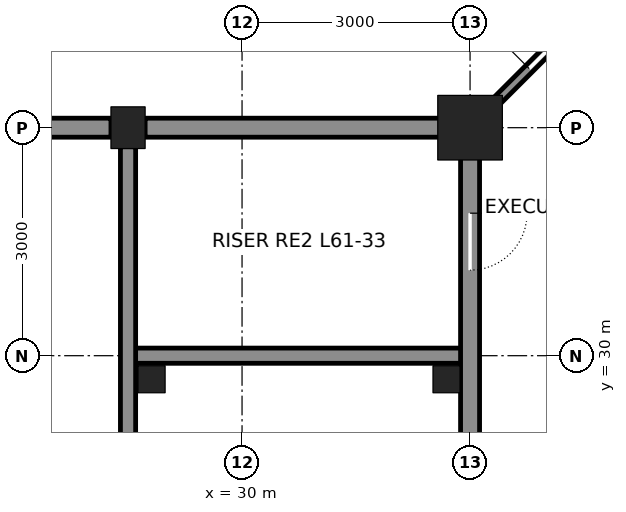
"""IFC4 building model, lengths in metres.
Left out: names, types, materials, properties, quantities, classifications, styles, units other than length and angle.
Written with IfcOpenShell. Run it as: python <this file> out.ifc"""

import sys

from ifc_helpers import new_model, si_unit, direction, frame, frame_2d, origin, origin_2d, place, context, subcontext, project, spatial, rectangle, hollow_rectangle, i_section, extrude, element, fill, save


model = new_model("IFC4")
c1 = context("Model", 3, precision=1e-05, world=origin(), true_north=direction((0.0, 1.0)))
c2 = subcontext(c1, "Body", "Model", "MODEL_VIEW")
j1 = project(units=[si_unit("LENGTHUNIT", "METRE"), si_unit("PLANEANGLEUNIT", "RADIAN")], contexts=[c1])
p1 = place(None, origin())
s1 = spatial("IfcSite", under=j1, at=p1, CompositionType="ELEMENT")
p2 = place(p1, origin())
s2 = spatial("IfcBuilding", under=s1, at=p2, CompositionType="ELEMENT")
p3 = place(p2, frame((0.0, 0.0, 274.8)))
s3 = spatial("IfcBuildingStorey", under=s2, at=p3, CompositionType="ELEMENT", Elevation=274.8)
p4 = place(p3, frame((28.5, 33.0, 0.0), z_axis=(0.0, 0.0, 1.0), x_axis=(1.0, 0.0, 0.0)))
e1 = element("IfcColumn", 1, at=p4, inside=s3, PredefinedType="COLUMN", context=c2, shape_type="SweptSolid", body=[
    extrude(i_section(OverallWidth=0.449, OverallDepth=0.549, WebThickness=0.072, FlangeThickness=0.115, at=origin_2d()), origin(), (0.0, 0.0, 1.0), 4.2),
])
p5 = place(p3, frame((33.0, 33.0, 0.0), z_axis=(0.0, 0.0, 1.0), x_axis=(1.0, 0.0, 0.0)))
e2 = element("IfcColumn", 2, at=p5, inside=s3, PredefinedType="COLUMN", context=c2, shape_type="SweptSolid", body=[
    extrude(hollow_rectangle(XDim=0.85, YDim=0.85, WallThickness=0.085, at=origin_2d()), origin(), (0.0, 0.0, 1.0), 4.2),
])
p6 = place(p3, frame((28.5, 30.0, 0.0), z_axis=(0.0, 0.0, 1.0), x_axis=(1.0, 0.0, 0.0)))
e3 = element("IfcWall", 3, at=p6, inside=s3, PredefinedType="SOLIDWALL", context=c2, shape_type="SweptSolid", body=[
    extrude(rectangle(XDim=4.5, YDim=0.2, at=frame_2d((2.25, 0.0))), origin(), (0.0, 0.0, 1.0), 4.04),
])
p7 = place(p3, frame((25.725, 33.0, 0.0), z_axis=(0.0, 0.0, 1.0), x_axis=(1.0, 0.0, 0.0)))
e4 = element("IfcWall", 4, at=p7, inside=s3, PredefinedType="SOLIDWALL", context=c2, shape_type="SweptSolid", body=[
    extrude(rectangle(XDim=2.55, YDim=0.25, at=frame_2d((1.275, 0.0))), origin(), (0.0, 0.0, 1.0), 3.181),
])
p8 = place(p3, frame((28.725, 33.0, 0.0), z_axis=(0.0, 0.0, 1.0), x_axis=(1.0, 0.0, 0.0)))
e5 = element("IfcWall", 5, at=p8, inside=s3, PredefinedType="SOLIDWALL", context=c2, shape_type="SweptSolid", body=[
    extrude(rectangle(XDim=4.025, YDim=0.25, at=frame_2d((2.013, 0.0))), origin(), (0.0, 0.0, 1.0), 3.181),
])
p9 = place(p3, frame((28.5, 24.25, 0.0), z_axis=(0.0, 0.0, 1.0), x_axis=(0.0, 1.0, 0.0)))
e6 = element("IfcWall", 6, at=p9, inside=s3, PredefinedType="SOLIDWALL", context=c2, shape_type="SweptSolid", body=[
    extrude(rectangle(XDim=8.5, YDim=0.2, at=frame_2d((4.25, 0.0))), origin(), (0.0, 0.0, 1.0), 3.113),
])
p10 = place(p3, frame((33.0, 24.25, 0.0), z_axis=(0.0, 0.0, 1.0), x_axis=(0.0, 1.0, 0.0)))
e7 = element("IfcWall", 7, at=p10, inside=s3, PredefinedType="SOLIDWALL", context=c2, shape_type="SweptSolid", body=[
    extrude(rectangle(XDim=8.5, YDim=0.25, at=frame_2d((4.25, 0.0))), origin(), (0.0, 0.0, 1.0), 3.113),
])
p11 = place(p10, frame((6.875, 0.0, 0.0)))
e8 = element("IfcOpeningElement", 8, at=p11, cuts=e7, PredefinedType="OPENING", context=c2, shape_type="SweptSolid", body=[
    extrude(rectangle(XDim=0.75, YDim=2.1, at=frame_2d((0.375, 1.05))), frame((0.0, 0.135, 0.0), z_axis=(0.0, -1.0, 0.0), x_axis=(1.0, 0.0, 0.0)), (0.0, 0.0, 1.0), 0.27),
])
p12 = place(p3, frame((33.0, 33.0, 0.0), z_axis=(0.0, 0.0, 1.0), x_axis=(0.707106781187, 0.707106781187, 0.0)))
e9 = element("IfcWall", 9, at=p12, inside=s3, PredefinedType="PARTITIONING", context=c2, shape_type="SweptSolid", body=[
    extrude(rectangle(XDim=3.59, YDim=0.12, at=frame_2d((1.795, 0.0))), origin(), (0.0, 0.0, 1.0), 4.04),
])
p13 = place(p12, frame((1.1, 0.0, 0.0)))
e10 = element("IfcOpeningElement", 10, at=p13, cuts=e9, PredefinedType="OPENING", context=c2, shape_type="SweptSolid", body=[
    extrude(rectangle(XDim=1.0, YDim=2.4, at=frame_2d((0.5, 1.2))), frame((0.0, 0.07, 0.0), z_axis=(0.0, -1.0, 0.0), x_axis=(1.0, 0.0, 0.0)), (0.0, 0.0, 1.0), 0.14),
])
for number, where, z_axis, x_axis in (
    (11, (28.81, 29.69, 0.0), (0.0, 0.0, 1.0), (1.0, 0.0, 0.0)),
    (12, (32.69, 29.69, 0.0), (0.0, 0.0, 1.0), (1.0, 0.0, 0.0)),
):
    element("IfcColumn", number, at=place(p3, frame(where, z_axis=z_axis, x_axis=x_axis)), inside=s3, PredefinedType="COLUMN", context=c2, shape_type="SweptSolid", body=[
        extrude(hollow_rectangle(XDim=0.356, YDim=0.356, WallThickness=0.009, at=origin_2d()), origin(), (0.0, 0.0, 1.0), 4.2),
    ])
p14 = place(p11, frame((0.75, 0.0, 0.0), z_axis=(0.0, 0.0, 1.0), x_axis=(-1.0, 0.0, 0.0)))
e13 = element("IfcDoor", 13, at=p14, inside=s3, OperationType="SINGLE_SWING_LEFT", PredefinedType="DOOR", context=c2, shape_type="SweptSolid", body=[
    extrude(rectangle(XDim=0.75, YDim=2.1, at=frame_2d((0.375, 1.05))), frame((0.0, 0.025, 0.0), z_axis=(0.0, -1.0, 0.0), x_axis=(1.0, 0.0, 0.0)), (0.0, 0.0, 1.0), 0.05),
])
fill(e8, e13)
p15 = place(p13, origin())
e14 = element("IfcDoor", 14, at=p15, inside=s3, OperationType="SINGLE_SWING_LEFT", PredefinedType="DOOR", context=c2, shape_type="SweptSolid", body=[
    extrude(rectangle(XDim=1.0, YDim=2.4, at=frame_2d((0.5, 1.2))), frame((0.0, 0.025, 0.0), z_axis=(0.0, -1.0, 0.0), x_axis=(1.0, 0.0, 0.0)), (0.0, 0.0, 1.0), 0.05),
])
fill(e10, e14)
save(model, sys.argv[1])
